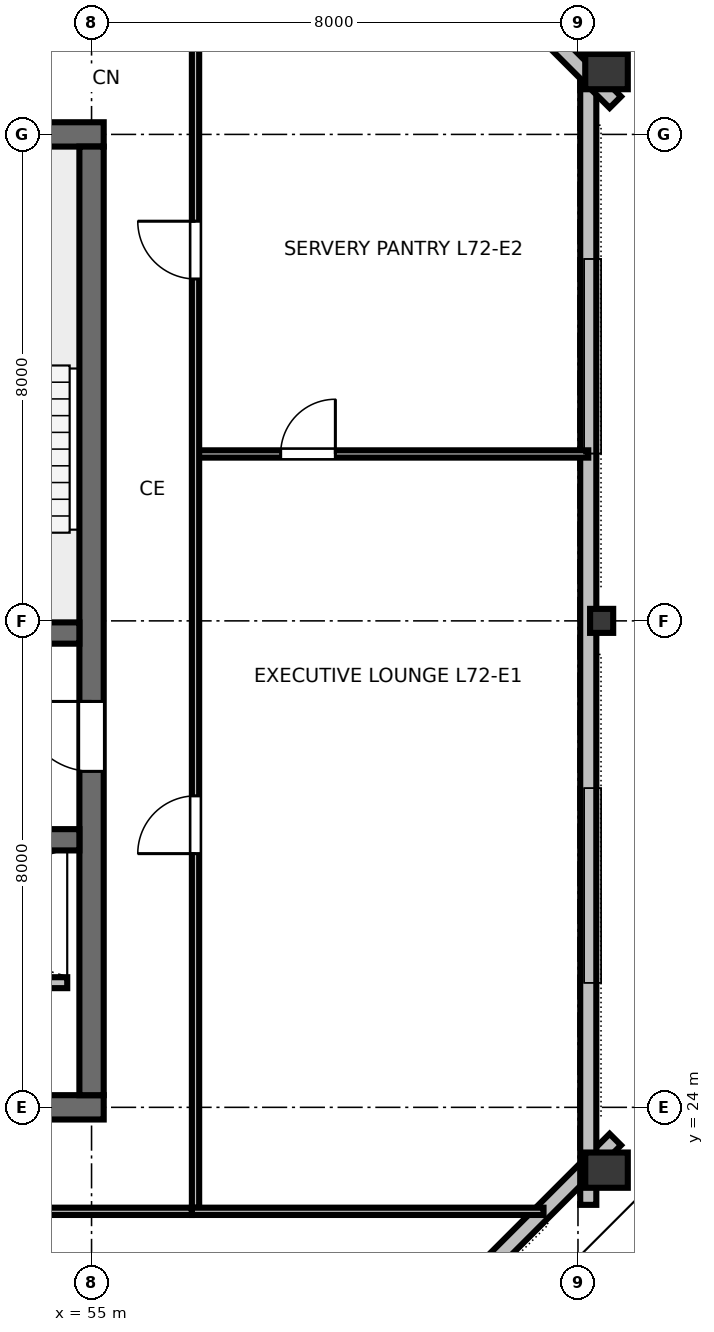
"""IFC4 building model, lengths in metres.
Left out: names, types, materials, properties, quantities, classifications, styles, units other than length and angle.
Written with IfcOpenShell. Run it as: python <this file> out.ifc"""

import sys

from ifc_helpers import new_model, si_unit, direction, frame, frame_2d, origin, origin_2d, place, context, subcontext, project, spatial, rectangle, hollow_rectangle, i_section, extrude, element, fill, save


model = new_model("IFC4")
c1 = context("Model", 3, precision=1e-05, world=origin(), true_north=direction((0.0, 1.0)))
c2 = subcontext(c1, "Body", "Model", "MODEL_VIEW")
j1 = project(units=[si_unit("LENGTHUNIT", "METRE"), si_unit("PLANEANGLEUNIT", "RADIAN")], contexts=[c1])
p1 = place(None, origin())
s1 = spatial("IfcSite", under=j1, at=p1, CompositionType="ELEMENT")
p2 = place(p1, origin())
s2 = spatial("IfcBuilding", under=s1, at=p2, CompositionType="ELEMENT")
p3 = place(p2, frame((0.0, 0.0, 271.8)))
s3 = spatial("IfcBuildingStorey", under=s2, at=p3, CompositionType="ELEMENT", Elevation=271.8)
p4 = place(p3, frame((36.8, 24.0, 0.0), z_axis=(0.0, 0.0, 1.0), x_axis=(1.0, 0.0, 0.0)))
e1 = element("IfcWall", 1, at=p4, inside=s3, PredefinedType="SHEAR", context=c2, shape_type="SweptSolid", body=[
    extrude(rectangle(XDim=18.4, YDim=0.4, at=frame_2d((9.2, 0.0))), origin(), (0.0, 0.0, 1.0), 3.36),
])
p5 = place(p4, frame((13.4, 0.0, 0.0)))
e2 = element("IfcOpeningElement", 2, at=p5, cuts=e1, PredefinedType="OPENING", context=c2, shape_type="SweptSolid", body=[
    extrude(rectangle(XDim=1.6, YDim=2.15, at=frame_2d((0.8, 1.075))), frame((0.0, 0.21, 0.0), z_axis=(0.0, -1.0, 0.0), x_axis=(1.0, 0.0, 0.0)), (0.0, 0.0, 1.0), 0.42),
])
p6 = place(p3, frame((36.8, 40.0, 0.0), z_axis=(0.0, 0.0, 1.0), x_axis=(1.0, 0.0, 0.0)))
e3 = element("IfcWall", 3, at=p6, inside=s3, PredefinedType="SHEAR", context=c2, shape_type="SweptSolid", body=[
    extrude(rectangle(XDim=18.4, YDim=0.4, at=frame_2d((9.2, 0.0))), origin(), (0.0, 0.0, 1.0), 3.36),
])
p7 = place(p6, frame((8.7, 0.0, 0.0)))
e4 = element("IfcOpeningElement", 4, at=p7, cuts=e3, PredefinedType="OPENING", context=c2, shape_type="SweptSolid", body=[
    extrude(rectangle(XDim=1.0, YDim=2.15, at=frame_2d((0.5, 1.075))), frame((0.0, 0.21, 0.0), z_axis=(0.0, -1.0, 0.0), x_axis=(1.0, 0.0, 0.0)), (0.0, 0.0, 1.0), 0.42),
])
p8 = place(p3, frame((55.0, 24.2, 0.0), z_axis=(0.0, 0.0, 1.0), x_axis=(0.0, 1.0, 0.0)))
e5 = element("IfcWall", 5, at=p8, inside=s3, PredefinedType="SHEAR", context=c2, shape_type="SweptSolid", body=[
    extrude(rectangle(XDim=15.6, YDim=0.4, at=frame_2d((7.8, 0.0))), origin(), (0.0, 0.0, 1.0), 3.36),
])
p9 = place(p8, frame((5.325, 0.0, 0.0)))
e6 = element("IfcOpeningElement", 6, at=p9, cuts=e5, PredefinedType="OPENING", context=c2, shape_type="SweptSolid", body=[
    extrude(rectangle(XDim=1.15, YDim=2.15, at=frame_2d((0.575, 1.075))), frame((0.0, 0.21, 0.0), z_axis=(0.0, -1.0, 0.0), x_axis=(1.0, 0.0, 0.0)), (0.0, 0.0, 1.0), 0.42),
])
p10 = place(p3, frame((37.2, 31.8, 0.0), z_axis=(0.0, 0.0, 1.0), x_axis=(1.0, 0.0, 0.0)))
e7 = element("IfcWall", 7, at=p10, inside=s3, PredefinedType="SHEAR", context=c2, shape_type="SweptSolid", body=[
    extrude(rectangle(XDim=17.6, YDim=0.35, at=frame_2d((8.8, 0.0))), origin(), (0.0, 0.0, 1.0), 3.36),
])
p11 = place(p10, frame((0.85, 0.0, 0.0)))
e8 = element("IfcOpeningElement", 8, at=p11, cuts=e7, PredefinedType="OPENING", context=c2, shape_type="SweptSolid", body=[
    extrude(rectangle(XDim=1.1, YDim=2.15, at=frame_2d((0.55, 1.075))), frame((0.0, 0.185, 0.0), z_axis=(0.0, -1.0, 0.0), x_axis=(1.0, 0.0, 0.0)), (0.0, 0.0, 1.0), 0.37),
])
p12 = place(p10, frame((14.75, 0.0, 0.0)))
e9 = element("IfcOpeningElement", 9, at=p12, cuts=e7, PredefinedType="OPENING", context=c2, shape_type="SweptSolid", body=[
    extrude(rectangle(XDim=1.1, YDim=2.15, at=frame_2d((0.55, 1.075))), frame((0.0, 0.185, 0.0), z_axis=(0.0, -1.0, 0.0), x_axis=(1.0, 0.0, 0.0)), (0.0, 0.0, 1.0), 0.37),
])
p13 = place(p3, frame((37.2, 28.4, 0.0), z_axis=(0.0, 0.0, 1.0), x_axis=(1.0, 0.0, 0.0)))
e10 = element("IfcWall", 10, at=p13, inside=s3, PredefinedType="SHEAR", context=c2, shape_type="SweptSolid", body=[
    extrude(rectangle(XDim=17.6, YDim=0.35, at=frame_2d((8.8, 0.0))), origin(), (0.0, 0.0, 1.0), 3.36),
])
p14 = place(p3, frame((63.469, 22.967, 0.0), z_axis=(0.0, 0.0, 1.0), x_axis=(0.0, 1.0, 0.0)))
e11 = element("IfcColumn", 11, at=p14, inside=s3, PredefinedType="COLUMN", context=c2, shape_type="SweptSolid", body=[
    extrude(hollow_rectangle(XDim=0.58, YDim=0.7, WallThickness=0.032, at=origin_2d()), origin(), (0.0, 0.0, 1.0), 3.373),
])
p15 = place(p3, frame((63.389, 32.0, 0.0), z_axis=(0.0, 0.0, 1.0), x_axis=(0.0, 1.0, 0.0)))
e12 = element("IfcColumn", 12, at=p15, inside=s3, PredefinedType="COLUMN", context=c2, shape_type="SweptSolid", body=[
    extrude(i_section(OverallWidth=0.395, OverallDepth=0.38, WebThickness=0.019, FlangeThickness=0.03, FilletRadius=0.025, at=origin_2d()), origin(), (0.0, 0.0, 1.0), 3.373),
])
p16 = place(p3, frame((63.469, 41.033, 0.0), z_axis=(0.0, 0.0, 1.0), x_axis=(0.0, 1.0, 0.0)))
e13 = element("IfcColumn", 13, at=p16, inside=s3, PredefinedType="COLUMN", context=c2, shape_type="SweptSolid", body=[
    extrude(hollow_rectangle(XDim=0.58, YDim=0.7, WallThickness=0.032, at=origin_2d()), origin(), (0.0, 0.0, 1.0), 3.373),
])
p17 = place(p3, frame((55.747, 15.604, 0.0), z_axis=(0.0, 0.0, 1.0), x_axis=(0.707106781187, 0.707106781187, 0.0)))
e14 = element("IfcWall", 14, at=p17, inside=s3, PredefinedType="STANDARD", context=c2, shape_type="SweptSolid", body=[
    extrude(rectangle(XDim=11.125, YDim=0.265, at=frame_2d((5.562, 0.0))), origin(), (0.0, 0.0, 1.0), 2.832),
])
p18 = place(p3, frame((63.169, 22.396, 0.0), z_axis=(0.0, 0.0, 1.0), x_axis=(0.0, 1.0, 0.0)))
e15 = element("IfcWall", 15, at=p18, inside=s3, PredefinedType="STANDARD", context=c2, shape_type="SweptSolid", body=[
    extrude(rectangle(XDim=19.207, YDim=0.265, at=frame_2d((9.604, 0.0))), origin(), (0.0, 0.0, 1.0), 2.832),
])
p19 = place(p3, frame((63.614, 40.529, 0.0), z_axis=(0.0, 0.0, 1.0), x_axis=(-0.707106781187, 0.707106781187, 0.0)))
e16 = element("IfcWall", 16, at=p19, inside=s3, PredefinedType="STANDARD", context=c2, shape_type="SweptSolid", body=[
    extrude(rectangle(XDim=11.125, YDim=0.265, at=frame_2d((5.562, 0.0))), origin(), (0.0, 0.0, 1.0), 2.832),
])
p20 = place(p3, frame((47.6, 26.05, 0.0), z_axis=(0.0, 0.0, 1.0), x_axis=(1.0, 0.0, 0.0)))
e17 = element("IfcWall", 17, at=p20, inside=s3, PredefinedType="PARTITIONING", context=c2, shape_type="SweptSolid", body=[
    extrude(rectangle(XDim=7.0, YDim=0.18, at=frame_2d((3.5, 0.0))), origin(), (0.0, 0.0, 1.0), 3.375),
])
p21 = place(p20, frame((1.2, 0.0, 0.0)))
e18 = element("IfcOpeningElement", 18, at=p21, cuts=e17, PredefinedType="OPENING", context=c2, shape_type="SweptSolid", body=[
    extrude(rectangle(XDim=1.05, YDim=2.15, at=frame_2d((0.525, 1.075))), frame((0.0, 0.1, 0.0), z_axis=(0.0, -1.0, 0.0), x_axis=(1.0, 0.0, 0.0)), (0.0, 0.0, 1.0), 0.2),
])
p22 = place(p20, frame((3.4, 0.0, 0.0)))
e19 = element("IfcOpeningElement", 19, at=p22, cuts=e17, PredefinedType="OPENING", context=c2, shape_type="SweptSolid", body=[
    extrude(rectangle(XDim=1.05, YDim=2.15, at=frame_2d((0.525, 1.075))), frame((0.0, 0.1, 0.0), z_axis=(0.0, -1.0, 0.0), x_axis=(1.0, 0.0, 0.0)), (0.0, 0.0, 1.0), 0.2),
])
p23 = place(p3, frame((35.35, 22.29, 0.0), z_axis=(0.0, 0.0, 1.0), x_axis=(1.0, 0.0, 0.0)))
e20 = element("IfcWall", 20, at=p23, inside=s3, PredefinedType="PARTITIONING", context=c2, shape_type="SweptSolid", body=[
    extrude(rectangle(XDim=21.3, YDim=0.12, at=frame_2d((10.65, 0.0))), origin(), (0.0, 0.0, 1.0), 2.655),
])
p24 = place(p23, frame((3.679, 0.0, 0.0)))
e21 = element("IfcOpeningElement", 21, at=p24, cuts=e20, PredefinedType="OPENING", context=c2, shape_type="SweptSolid", body=[
    extrude(rectangle(XDim=0.95, YDim=2.15, at=frame_2d((0.475, 1.075))), frame((0.0, 0.07, 0.0), z_axis=(0.0, -1.0, 0.0), x_axis=(1.0, 0.0, 0.0)), (0.0, 0.0, 1.0), 0.14),
])
p25 = place(p23, frame((16.191, 0.0, 0.0)))
e22 = element("IfcOpeningElement", 22, at=p25, cuts=e20, PredefinedType="OPENING", context=c2, shape_type="SweptSolid", body=[
    extrude(rectangle(XDim=0.95, YDim=2.15, at=frame_2d((0.475, 1.075))), frame((0.0, 0.07, 0.0), z_axis=(0.0, -1.0, 0.0), x_axis=(1.0, 0.0, 0.0)), (0.0, 0.0, 1.0), 0.14),
])
p26 = place(p3, frame((56.71, 34.745, 0.0), z_axis=(0.0, 0.0, 1.0), x_axis=(1.0, 0.0, 0.0)))
e23 = element("IfcWall", 23, at=p26, inside=s3, PredefinedType="PARTITIONING", context=c2, shape_type="SweptSolid", body=[
    extrude(rectangle(XDim=6.459, YDim=0.12, at=frame_2d((3.229, 0.0))), origin(), (0.0, 0.0, 1.0), 2.655),
])
p27 = place(p26, frame((1.4, 0.0, 0.0)))
e24 = element("IfcOpeningElement", 24, at=p27, cuts=e23, PredefinedType="OPENING", context=c2, shape_type="SweptSolid", body=[
    extrude(rectangle(XDim=0.9, YDim=2.15, at=frame_2d((0.45, 1.075))), frame((0.0, 0.07, 0.0), z_axis=(0.0, -1.0, 0.0), x_axis=(1.0, 0.0, 0.0)), (0.0, 0.0, 1.0), 0.14),
])
p28 = place(p3, frame((56.71, 22.35, 0.0), z_axis=(0.0, 0.0, 1.0), x_axis=(0.0, 1.0, 0.0)))
e25 = element("IfcWall", 25, at=p28, inside=s3, PredefinedType="PARTITIONING", context=c2, shape_type="SweptSolid", body=[
    extrude(rectangle(XDim=19.3, YDim=0.12, at=frame_2d((9.65, 0.0))), origin(), (0.0, 0.0, 1.0), 2.655),
])
p29 = place(p28, frame((5.823, 0.0, 0.0)))
e26 = element("IfcOpeningElement", 26, at=p29, cuts=e25, PredefinedType="OPENING", context=c2, shape_type="SweptSolid", body=[
    extrude(rectangle(XDim=0.95, YDim=2.15, at=frame_2d((0.475, 1.075))), frame((0.0, 0.07, 0.0), z_axis=(0.0, -1.0, 0.0), x_axis=(1.0, 0.0, 0.0)), (0.0, 0.0, 1.0), 0.14),
])
p30 = place(p28, frame((15.272, 0.0, 0.0)))
e27 = element("IfcOpeningElement", 27, at=p30, cuts=e25, PredefinedType="OPENING", context=c2, shape_type="SweptSolid", body=[
    extrude(rectangle(XDim=0.95, YDim=2.15, at=frame_2d((0.475, 1.075))), frame((0.0, 0.07, 0.0), z_axis=(0.0, -1.0, 0.0), x_axis=(1.0, 0.0, 0.0)), (0.0, 0.0, 1.0), 0.14),
])
p31 = place(p3, frame((56.65, 22.29, 0.0), z_axis=(0.0, 0.0, 1.0), x_axis=(1.0, 0.0, 0.0)))
e28 = element("IfcWall", 28, at=p31, inside=s3, PredefinedType="PARTITIONING", context=c2, shape_type="SweptSolid", body=[
    extrude(rectangle(XDim=5.783, YDim=0.12, at=frame_2d((2.892, 0.0))), origin(), (0.0, 0.0, 1.0), 2.655),
])
p32 = place(p9, origin())
e29 = element("IfcDoor", 29, at=p32, inside=s3, OperationType="SINGLE_SWING_RIGHT", PredefinedType="DOOR", context=c2, shape_type="SweptSolid", body=[
    extrude(rectangle(XDim=1.15, YDim=2.15, at=frame_2d((0.575, 1.075))), frame((0.0, 0.025, 0.0), z_axis=(0.0, -1.0, 0.0), x_axis=(1.0, 0.0, 0.0)), (0.0, 0.0, 1.0), 0.05),
])
fill(e6, e29)
p33 = place(p27, origin())
e30 = element("IfcDoor", 30, at=p33, inside=s3, OperationType="SINGLE_SWING_RIGHT", PredefinedType="DOOR", context=c2, shape_type="SweptSolid", body=[
    extrude(rectangle(XDim=0.9, YDim=2.15, at=frame_2d((0.45, 1.075))), frame((0.0, 0.025, 0.0), z_axis=(0.0, -1.0, 0.0), x_axis=(1.0, 0.0, 0.0)), (0.0, 0.0, 1.0), 0.05),
])
fill(e24, e30)
p34 = place(p29, origin())
e31 = element("IfcDoor", 31, at=p34, inside=s3, OperationType="SINGLE_SWING_LEFT", PredefinedType="DOOR", context=c2, shape_type="SweptSolid", body=[
    extrude(rectangle(XDim=0.95, YDim=2.15, at=frame_2d((0.475, 1.075))), frame((0.0, 0.025, 0.0), z_axis=(0.0, -1.0, 0.0), x_axis=(1.0, 0.0, 0.0)), (0.0, 0.0, 1.0), 0.05),
])
fill(e26, e31)
p35 = place(p30, origin())
e32 = element("IfcDoor", 32, at=p35, inside=s3, OperationType="SINGLE_SWING_RIGHT", PredefinedType="DOOR", context=c2, shape_type="SweptSolid", body=[
    extrude(rectangle(XDim=0.95, YDim=2.15, at=frame_2d((0.475, 1.075))), frame((0.0, 0.025, 0.0), z_axis=(0.0, -1.0, 0.0), x_axis=(1.0, 0.0, 0.0)), (0.0, 0.0, 1.0), 0.05),
])
fill(e27, e32)
save(model, sys.argv[1])
